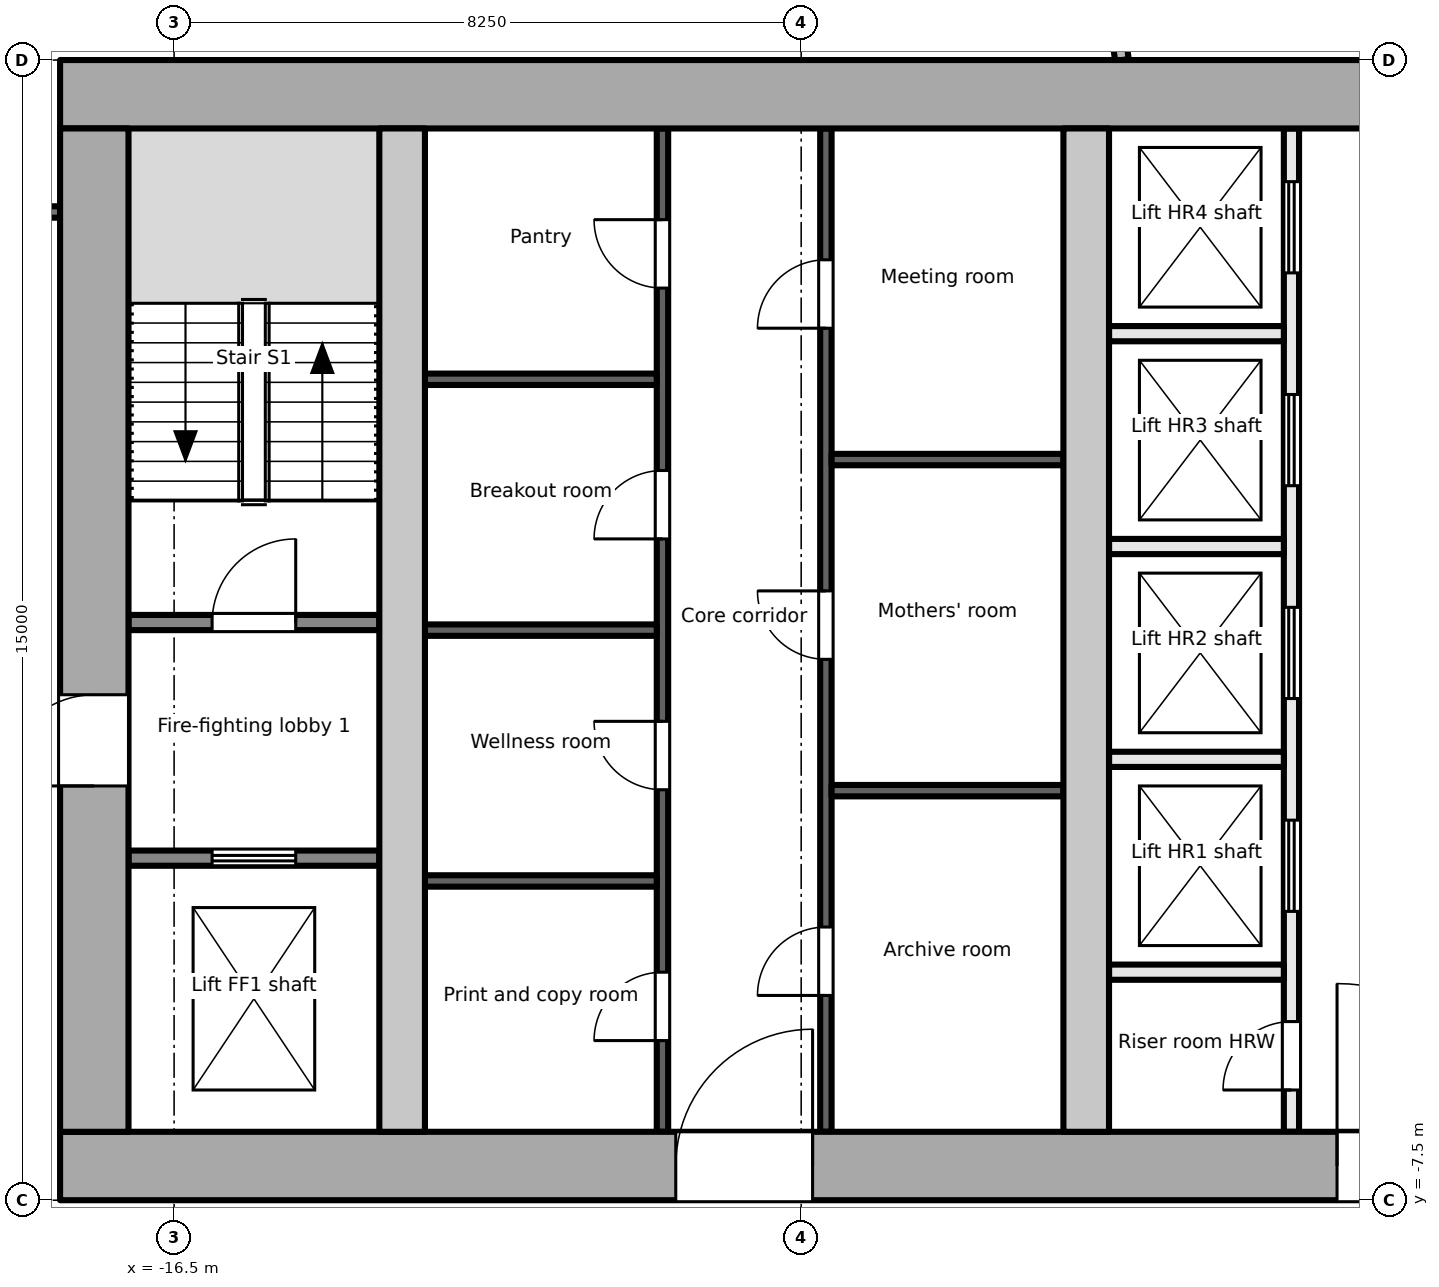
"""IFC4 building model, lengths in metres.
Left out: names, types, materials, properties, quantities, classifications, styles, units other than length and angle.
Written with IfcOpenShell. Run it as: python <this file> out.ifc"""

import sys

from ifc_helpers import new_model, si_unit, direction, frame, frame_2d, origin, place, context, subcontext, project, spatial, rectangle, extrude, element, fill, save


model = new_model("IFC4")
c1 = context("Model", 3, precision=1e-05, world=origin(), true_north=direction((0.0, 1.0)))
c2 = subcontext(c1, "Body", "Model", "MODEL_VIEW")
j1 = project(units=[si_unit("LENGTHUNIT", "METRE"), si_unit("PLANEANGLEUNIT", "RADIAN")], contexts=[c1])
p1 = place(None, origin())
s1 = spatial("IfcSite", under=j1, at=p1, CompositionType="ELEMENT")
p2 = place(p1, origin())
s2 = spatial("IfcBuilding", under=s1, at=p2, CompositionType="ELEMENT")
p3 = place(p2, frame((0.0, 0.0, 168.5)))
s3 = spatial("IfcBuildingStorey", under=s2, at=p3, CompositionType="ELEMENT", Elevation=168.5)
p4 = place(p3, frame((-18.0, -7.05, -0.2), z_axis=(0.0, 0.0, 1.0), x_axis=(1.0, 0.0, 0.0)))
e1 = element("IfcWall", 1, at=p4, inside=s3, PredefinedType="SHEAR", context=c2, shape_type="SweptSolid", body=[
    extrude(rectangle(XDim=36.0, YDim=0.9, at=frame_2d((18.0, 0.0))), origin(), (0.0, 0.0, 1.0), 3.9),
])
p5 = place(p4, frame((8.1, 0.0, 0.2)))
e2 = element("IfcOpeningElement", 2, at=p5, cuts=e1, PredefinedType="OPENING", context=c2, shape_type="SweptSolid", body=[
    extrude(rectangle(XDim=1.8, YDim=2.1, at=frame_2d((0.9, 1.05))), frame((0.0, 0.46, 0.0), z_axis=(0.0, -1.0, 0.0), x_axis=(1.0, 0.0, 0.0)), (0.0, 0.0, 1.0), 0.921),
])
p6 = place(p4, frame((16.8, 0.0, 0.2)))
e3 = element("IfcOpeningElement", 3, at=p6, cuts=e1, PredefinedType="OPENING", context=c2, shape_type="SweptSolid", body=[
    extrude(rectangle(XDim=2.4, YDim=2.1, at=frame_2d((1.2, 1.05))), frame((0.0, 0.46, 0.0), z_axis=(0.0, -1.0, 0.0), x_axis=(1.0, 0.0, 0.0)), (0.0, 0.0, 1.0), 0.921),
])
p7 = place(p4, frame((26.1, 0.0, 0.2)))
e4 = element("IfcOpeningElement", 4, at=p7, cuts=e1, PredefinedType="OPENING", context=c2, shape_type="SweptSolid", body=[
    extrude(rectangle(XDim=2.4, YDim=2.1, at=frame_2d((1.2, 1.05))), frame((0.0, 0.46, 0.0), z_axis=(0.0, -1.0, 0.0), x_axis=(1.0, 0.0, 0.0)), (0.0, 0.0, 1.0), 0.921),
])
p8 = place(p3, frame((-18.0, 7.05, -0.2), z_axis=(0.0, 0.0, 1.0), x_axis=(1.0, 0.0, 0.0)))
e5 = element("IfcWall", 5, at=p8, inside=s3, PredefinedType="SHEAR", context=c2, shape_type="SweptSolid", body=[
    extrude(rectangle(XDim=36.0, YDim=0.9, at=frame_2d((18.0, 0.0))), origin(), (0.0, 0.0, 1.0), 3.9),
])
p9 = place(p3, frame((-17.55, -6.6, -0.2), z_axis=(0.0, 0.0, 1.0), x_axis=(0.0, 1.0, 0.0)))
e6 = element("IfcWall", 6, at=p9, inside=s3, PredefinedType="SHEAR", context=c2, shape_type="SweptSolid", body=[
    extrude(rectangle(XDim=13.2, YDim=0.9, at=frame_2d((6.6, 0.0))), origin(), (0.0, 0.0, 1.0), 3.9),
])
p10 = place(p9, frame((4.55, 0.0, 0.2)))
e7 = element("IfcOpeningElement", 7, at=p10, cuts=e6, PredefinedType="OPENING", context=c2, shape_type="SweptSolid", body=[
    extrude(rectangle(XDim=1.2, YDim=2.1, at=frame_2d((0.6, 1.05))), frame((0.0, 0.46, 0.0), z_axis=(0.0, -1.0, 0.0), x_axis=(1.0, 0.0, 0.0)), (0.0, 0.0, 1.0), 0.921),
])
for number, where, z_axis, x_axis in (
    (8, (-13.5, -6.6, -0.2), (0.0, 0.0, 1.0), (0.0, 1.0, 0.0)),
    (9, (-4.5, -6.6, -0.2), (0.0, 0.0, 1.0), (0.0, 1.0, 0.0)),
):
    element("IfcWall", number, at=place(p3, frame(where, z_axis=z_axis, x_axis=x_axis)), inside=s3, PredefinedType="SHEAR", context=c2, shape_type="SweptSolid", body=[
        extrude(rectangle(XDim=13.2, YDim=0.6, at=frame_2d((6.6, 0.0))), origin(), (0.0, 0.0, 1.0), 3.9),
    ])
p11 = place(p3, frame((-17.1, -3.0, 0.0), z_axis=(0.0, 0.0, 1.0), x_axis=(1.0, 0.0, 0.0)))
e10 = element("IfcWall", 10, at=p11, inside=s3, PredefinedType="PARTITIONING", context=c2, shape_type="SweptSolid", body=[
    extrude(rectangle(XDim=3.3, YDim=0.2, at=frame_2d((1.65, 0.0))), origin(), (0.0, 0.0, 1.0), 3.7),
])
p12 = place(p11, frame((1.1, 0.0, 0.0)))
e11 = element("IfcOpeningElement", 11, at=p12, cuts=e10, PredefinedType="OPENING", context=c2, shape_type="SweptSolid", body=[
    extrude(rectangle(XDim=1.1, YDim=2.1, at=frame_2d((0.55, 1.05))), frame((0.0, 0.111, 0.0), z_axis=(0.0, -1.0, 0.0), x_axis=(1.0, 0.0, 0.0)), (0.0, 0.0, 1.0), 0.221),
])
p13 = place(p3, frame((-17.1, 0.1, 0.0), z_axis=(0.0, 0.0, 1.0), x_axis=(1.0, 0.0, 0.0)))
e12 = element("IfcWall", 12, at=p13, inside=s3, PredefinedType="PARTITIONING", context=c2, shape_type="SweptSolid", body=[
    extrude(rectangle(XDim=3.3, YDim=0.2, at=frame_2d((1.65, 0.0))), origin(), (0.0, 0.0, 1.0), 3.7),
])
p14 = place(p13, frame((1.1, 0.0, 0.0)))
e13 = element("IfcOpeningElement", 13, at=p14, cuts=e12, PredefinedType="OPENING", context=c2, shape_type="SweptSolid", body=[
    extrude(rectangle(XDim=1.1, YDim=2.1, at=frame_2d((0.55, 1.05))), frame((0.0, 0.111, 0.0), z_axis=(0.0, -1.0, 0.0), x_axis=(1.0, 0.0, 0.0)), (0.0, 0.0, 1.0), 0.221),
])
p15 = place(p3, frame((-10.075, -6.6, 0.0), z_axis=(0.0, 0.0, 1.0), x_axis=(0.0, 1.0, 0.0)))
e14 = element("IfcWall", 14, at=p15, inside=s3, PredefinedType="PARTITIONING", context=c2, shape_type="SweptSolid", body=[
    extrude(rectangle(XDim=13.2, YDim=0.15, at=frame_2d((6.6, 0.0))), origin(), (0.0, 0.0, 1.0), 3.7),
])
p16 = place(p15, frame((1.2, 0.0, 0.0)))
e15 = element("IfcOpeningElement", 15, at=p16, cuts=e14, PredefinedType="OPENING", context=c2, shape_type="SweptSolid", body=[
    extrude(rectangle(XDim=0.9, YDim=2.1, at=frame_2d((0.45, 1.05))), frame((0.0, 0.085, 0.0), z_axis=(0.0, -1.0, 0.0), x_axis=(1.0, 0.0, 0.0)), (0.0, 0.0, 1.0), 0.171),
])
p17 = place(p15, frame((4.5, 0.0, 0.0)))
e16 = element("IfcOpeningElement", 16, at=p17, cuts=e14, PredefinedType="OPENING", context=c2, shape_type="SweptSolid", body=[
    extrude(rectangle(XDim=0.9, YDim=2.1, at=frame_2d((0.45, 1.05))), frame((0.0, 0.085, 0.0), z_axis=(0.0, -1.0, 0.0), x_axis=(1.0, 0.0, 0.0)), (0.0, 0.0, 1.0), 0.171),
])
p18 = place(p15, frame((7.8, 0.0, 0.0)))
e17 = element("IfcOpeningElement", 17, at=p18, cuts=e14, PredefinedType="OPENING", context=c2, shape_type="SweptSolid", body=[
    extrude(rectangle(XDim=0.9, YDim=2.1, at=frame_2d((0.45, 1.05))), frame((0.0, 0.085, 0.0), z_axis=(0.0, -1.0, 0.0), x_axis=(1.0, 0.0, 0.0)), (0.0, 0.0, 1.0), 0.171),
])
p19 = place(p15, frame((11.1, 0.0, 0.0)))
e18 = element("IfcOpeningElement", 18, at=p19, cuts=e14, PredefinedType="OPENING", context=c2, shape_type="SweptSolid", body=[
    extrude(rectangle(XDim=0.9, YDim=2.1, at=frame_2d((0.45, 1.05))), frame((0.0, 0.085, 0.0), z_axis=(0.0, -1.0, 0.0), x_axis=(1.0, 0.0, 0.0)), (0.0, 0.0, 1.0), 0.171),
])
for number, where, z_axis, x_axis in (
    (19, (-13.2, -3.3, 0.0), (0.0, 0.0, 1.0), (1.0, 0.0, 0.0)),
    (20, (-13.2, 0.0, 0.0), (0.0, 0.0, 1.0), (1.0, 0.0, 0.0)),
    (21, (-13.2, 3.3, 0.0), (0.0, 0.0, 1.0), (1.0, 0.0, 0.0)),
):
    element("IfcWall", number, at=place(p3, frame(where, z_axis=z_axis, x_axis=x_axis)), inside=s3, PredefinedType="PARTITIONING", context=c2, shape_type="SweptSolid", body=[
        extrude(rectangle(XDim=3.05, YDim=0.15, at=frame_2d((1.525, 0.0))), origin(), (0.0, 0.0, 1.0), 3.7),
    ])
p20 = place(p3, frame((-7.925, -6.6, 0.0), z_axis=(0.0, 0.0, 1.0), x_axis=(0.0, 1.0, 0.0)))
e22 = element("IfcWall", 22, at=p20, inside=s3, PredefinedType="PARTITIONING", context=c2, shape_type="SweptSolid", body=[
    extrude(rectangle(XDim=13.2, YDim=0.15, at=frame_2d((6.6, 0.0))), origin(), (0.0, 0.0, 1.0), 3.7),
])
p21 = place(p20, frame((1.794, 0.0, 0.0)))
e23 = element("IfcOpeningElement", 23, at=p21, cuts=e22, PredefinedType="OPENING", context=c2, shape_type="SweptSolid", body=[
    extrude(rectangle(XDim=0.9, YDim=2.1, at=frame_2d((0.45, 1.05))), frame((0.0, 0.085, 0.0), z_axis=(0.0, -1.0, 0.0), x_axis=(1.0, 0.0, 0.0)), (0.0, 0.0, 1.0), 0.171),
])
p22 = place(p20, frame((6.216, 0.0, 0.0)))
e24 = element("IfcOpeningElement", 24, at=p22, cuts=e22, PredefinedType="OPENING", context=c2, shape_type="SweptSolid", body=[
    extrude(rectangle(XDim=0.9, YDim=2.1, at=frame_2d((0.45, 1.05))), frame((0.0, 0.085, 0.0), z_axis=(0.0, -1.0, 0.0), x_axis=(1.0, 0.0, 0.0)), (0.0, 0.0, 1.0), 0.171),
])
p23 = place(p20, frame((10.572, 0.0, 0.0)))
e25 = element("IfcOpeningElement", 25, at=p23, cuts=e22, PredefinedType="OPENING", context=c2, shape_type="SweptSolid", body=[
    extrude(rectangle(XDim=0.9, YDim=2.1, at=frame_2d((0.45, 1.05))), frame((0.0, 0.085, 0.0), z_axis=(0.0, -1.0, 0.0), x_axis=(1.0, 0.0, 0.0)), (0.0, 0.0, 1.0), 0.171),
])
for number, where, z_axis, x_axis in (
    (26, (-7.85, -2.112, 0.0), (0.0, 0.0, 1.0), (1.0, 0.0, 0.0)),
    (27, (-7.85, 2.244, 0.0), (0.0, 0.0, 1.0), (1.0, 0.0, 0.0)),
):
    element("IfcWall", number, at=place(p3, frame(where, z_axis=z_axis, x_axis=x_axis)), inside=s3, PredefinedType="PARTITIONING", context=c2, shape_type="SweptSolid", body=[
        extrude(rectangle(XDim=3.05, YDim=0.15, at=frame_2d((1.525, 0.0))), origin(), (0.0, 0.0, 1.0), 3.7),
    ])
p24 = place(p3, frame((-1.8, -6.6, 0.0), z_axis=(0.0, 0.0, 1.0), x_axis=(0.0, 1.0, 0.0)))
e28 = element("IfcWall", 28, at=p24, inside=s3, PredefinedType="PARTITIONING", context=c2, shape_type="SweptSolid", body=[
    extrude(rectangle(XDim=13.2, YDim=0.2, at=frame_2d((6.6, 0.0))), origin(), (0.0, 0.0, 1.0), 3.7),
])
p25 = place(p24, frame((0.55, 0.0, 0.0)))
e29 = element("IfcOpeningElement", 29, at=p25, cuts=e28, PredefinedType="OPENING", context=c2, shape_type="SweptSolid", body=[
    extrude(rectangle(XDim=0.9, YDim=2.1, at=frame_2d((0.45, 1.05))), frame((0.0, 0.111, 0.0), z_axis=(0.0, -1.0, 0.0), x_axis=(1.0, 0.0, 0.0)), (0.0, 0.0, 1.0), 0.221),
])
p26 = place(p24, frame((2.9, 0.0, 0.0)))
e30 = element("IfcOpeningElement", 30, at=p26, cuts=e28, PredefinedType="OPENING", context=c2, shape_type="SweptSolid", body=[
    extrude(rectangle(XDim=1.2, YDim=2.1, at=frame_2d((0.6, 1.05))), frame((0.0, 0.111, 0.0), z_axis=(0.0, -1.0, 0.0), x_axis=(1.0, 0.0, 0.0)), (0.0, 0.0, 1.0), 0.221),
])
p27 = place(p24, frame((5.7, 0.0, 0.0)))
e31 = element("IfcOpeningElement", 31, at=p27, cuts=e28, PredefinedType="OPENING", context=c2, shape_type="SweptSolid", body=[
    extrude(rectangle(XDim=1.2, YDim=2.1, at=frame_2d((0.6, 1.05))), frame((0.0, 0.111, 0.0), z_axis=(0.0, -1.0, 0.0), x_axis=(1.0, 0.0, 0.0)), (0.0, 0.0, 1.0), 0.221),
])
p28 = place(p24, frame((8.5, 0.0, 0.0)))
e32 = element("IfcOpeningElement", 32, at=p28, cuts=e28, PredefinedType="OPENING", context=c2, shape_type="SweptSolid", body=[
    extrude(rectangle(XDim=1.2, YDim=2.1, at=frame_2d((0.6, 1.05))), frame((0.0, 0.111, 0.0), z_axis=(0.0, -1.0, 0.0), x_axis=(1.0, 0.0, 0.0)), (0.0, 0.0, 1.0), 0.221),
])
p29 = place(p24, frame((11.3, 0.0, 0.0)))
e33 = element("IfcOpeningElement", 33, at=p29, cuts=e28, PredefinedType="OPENING", context=c2, shape_type="SweptSolid", body=[
    extrude(rectangle(XDim=1.2, YDim=2.1, at=frame_2d((0.6, 1.05))), frame((0.0, 0.111, 0.0), z_axis=(0.0, -1.0, 0.0), x_axis=(1.0, 0.0, 0.0)), (0.0, 0.0, 1.0), 0.221),
])
for number, where, z_axis, x_axis in (
    (34, (-4.2, -1.7, 0.0), (0.0, 0.0, 1.0), (1.0, 0.0, 0.0)),
    (35, (-4.2, 1.1, 0.0), (0.0, 0.0, 1.0), (1.0, 0.0, 0.0)),
    (36, (-4.2, 3.9, 0.0), (0.0, 0.0, 1.0), (1.0, 0.0, 0.0)),
    (37, (-4.2, -4.5, 0.0), (0.0, 0.0, 1.0), (1.0, 0.0, 0.0)),
):
    element("IfcWall", number, at=place(p3, frame(where, z_axis=z_axis, x_axis=x_axis)), inside=s3, PredefinedType="PARTITIONING", context=c2, shape_type="SweptSolid", body=[
        extrude(rectangle(XDim=2.3, YDim=0.2, at=frame_2d((1.15, 0.0))), origin(), (0.0, 0.0, 1.0), 3.7),
    ])
p30 = place(p3, frame((-20.325, 5.501, 0.0), z_axis=(0.0, 0.0, 1.0), x_axis=(1.0, 0.0, 0.0)))
e38 = element("IfcWall", 38, at=p30, inside=s3, PredefinedType="PARTITIONING", context=c2, shape_type="SweptSolid", body=[
    extrude(rectangle(XDim=2.325, YDim=0.15, at=frame_2d((1.163, 0.0))), origin(), (0.0, 0.0, 1.0), 3.7),
])
p31 = place(p3, frame((-4.437, 10.393, 0.0), z_axis=(0.0, 0.0, 1.0), x_axis=(0.139303486007, -0.990249735565, 0.0)))
e39 = element("IfcWall", 39, at=p31, inside=s3, PredefinedType="PARTITIONING", context=c2, shape_type="SweptSolid", body=[
    extrude(rectangle(XDim=2.922, YDim=0.18, at=frame_2d((1.461, 0.0))), origin(), (0.0, 0.0, 1.0), 3.25),
])
p32 = place(p12, origin())
e40 = element("IfcDoor", 40, at=p32, inside=s3, OperationType="DOUBLE_DOOR_SLIDING", PredefinedType="DOOR", context=c2, shape_type="SweptSolid", body=[
    extrude(rectangle(XDim=1.1, YDim=2.1, at=frame_2d((0.55, 1.05))), frame((0.0, 0.025, 0.0), z_axis=(0.0, -1.0, 0.0), x_axis=(1.0, 0.0, 0.0)), (0.0, 0.0, 1.0), 0.05),
])
fill(e11, e40)
p33 = place(p10, origin())
e41 = element("IfcDoor", 41, at=p33, inside=s3, OperationType="SINGLE_SWING_LEFT", PredefinedType="DOOR", context=c2, shape_type="SweptSolid", body=[
    extrude(rectangle(XDim=1.2, YDim=2.1, at=frame_2d((0.6, 1.05))), frame((0.0, 0.025, 0.0), z_axis=(0.0, -1.0, 0.0), x_axis=(1.0, 0.0, 0.0)), (0.0, 0.0, 1.0), 0.05),
])
fill(e7, e41)
p34 = place(p14, origin())
e42 = element("IfcDoor", 42, at=p34, inside=s3, OperationType="SINGLE_SWING_RIGHT", PredefinedType="DOOR", context=c2, shape_type="SweptSolid", body=[
    extrude(rectangle(XDim=1.1, YDim=2.1, at=frame_2d((0.55, 1.05))), frame((0.0, 0.025, 0.0), z_axis=(0.0, -1.0, 0.0), x_axis=(1.0, 0.0, 0.0)), (0.0, 0.0, 1.0), 0.05),
])
fill(e13, e42)
p35 = place(p16, origin())
e43 = element("IfcDoor", 43, at=p35, inside=s3, OperationType="SINGLE_SWING_LEFT", PredefinedType="DOOR", context=c2, shape_type="SweptSolid", body=[
    extrude(rectangle(XDim=0.9, YDim=2.1, at=frame_2d((0.45, 1.05))), frame((0.0, 0.025, 0.0), z_axis=(0.0, -1.0, 0.0), x_axis=(1.0, 0.0, 0.0)), (0.0, 0.0, 1.0), 0.05),
])
fill(e15, e43)
p36 = place(p17, origin())
e44 = element("IfcDoor", 44, at=p36, inside=s3, OperationType="SINGLE_SWING_RIGHT", PredefinedType="DOOR", context=c2, shape_type="SweptSolid", body=[
    extrude(rectangle(XDim=0.9, YDim=2.1, at=frame_2d((0.45, 1.05))), frame((0.0, 0.025, 0.0), z_axis=(0.0, -1.0, 0.0), x_axis=(1.0, 0.0, 0.0)), (0.0, 0.0, 1.0), 0.05),
])
fill(e16, e44)
p37 = place(p18, origin())
e45 = element("IfcDoor", 45, at=p37, inside=s3, OperationType="SINGLE_SWING_LEFT", PredefinedType="DOOR", context=c2, shape_type="SweptSolid", body=[
    extrude(rectangle(XDim=0.9, YDim=2.1, at=frame_2d((0.45, 1.05))), frame((0.0, 0.025, 0.0), z_axis=(0.0, -1.0, 0.0), x_axis=(1.0, 0.0, 0.0)), (0.0, 0.0, 1.0), 0.05),
])
fill(e17, e45)
p38 = place(p19, origin())
e46 = element("IfcDoor", 46, at=p38, inside=s3, OperationType="SINGLE_SWING_RIGHT", PredefinedType="DOOR", context=c2, shape_type="SweptSolid", body=[
    extrude(rectangle(XDim=0.9, YDim=2.1, at=frame_2d((0.45, 1.05))), frame((0.0, 0.025, 0.0), z_axis=(0.0, -1.0, 0.0), x_axis=(1.0, 0.0, 0.0)), (0.0, 0.0, 1.0), 0.05),
])
fill(e18, e46)
p39 = place(p21, origin())
e47 = element("IfcDoor", 47, at=p39, inside=s3, OperationType="SINGLE_SWING_LEFT", PredefinedType="DOOR", context=c2, shape_type="SweptSolid", body=[
    extrude(rectangle(XDim=0.9, YDim=2.1, at=frame_2d((0.45, 1.05))), frame((0.0, 0.025, 0.0), z_axis=(0.0, -1.0, 0.0), x_axis=(1.0, 0.0, 0.0)), (0.0, 0.0, 1.0), 0.05),
])
fill(e23, e47)
p40 = place(p22, origin())
e48 = element("IfcDoor", 48, at=p40, inside=s3, OperationType="SINGLE_SWING_RIGHT", PredefinedType="DOOR", context=c2, shape_type="SweptSolid", body=[
    extrude(rectangle(XDim=0.9, YDim=2.1, at=frame_2d((0.45, 1.05))), frame((0.0, 0.025, 0.0), z_axis=(0.0, -1.0, 0.0), x_axis=(1.0, 0.0, 0.0)), (0.0, 0.0, 1.0), 0.05),
])
fill(e24, e48)
p41 = place(p23, origin())
e49 = element("IfcDoor", 49, at=p41, inside=s3, OperationType="SINGLE_SWING_LEFT", PredefinedType="DOOR", context=c2, shape_type="SweptSolid", body=[
    extrude(rectangle(XDim=0.9, YDim=2.1, at=frame_2d((0.45, 1.05))), frame((0.0, 0.025, 0.0), z_axis=(0.0, -1.0, 0.0), x_axis=(1.0, 0.0, 0.0)), (0.0, 0.0, 1.0), 0.05),
])
fill(e25, e49)
p42 = place(p5, origin())
e50 = element("IfcDoor", 50, at=p42, inside=s3, OperationType="SINGLE_SWING_RIGHT", PredefinedType="DOOR", context=c2, shape_type="SweptSolid", body=[
    extrude(rectangle(XDim=1.8, YDim=2.1, at=frame_2d((0.9, 1.05))), frame((0.0, 0.025, 0.0), z_axis=(0.0, -1.0, 0.0), x_axis=(1.0, 0.0, 0.0)), (0.0, 0.0, 1.0), 0.05),
])
fill(e2, e50)
p43 = place(p25, origin())
e51 = element("IfcDoor", 51, at=p43, inside=s3, OperationType="SINGLE_SWING_LEFT", PredefinedType="DOOR", context=c2, shape_type="SweptSolid", body=[
    extrude(rectangle(XDim=0.9, YDim=2.1, at=frame_2d((0.45, 1.05))), frame((0.0, 0.025, 0.0), z_axis=(0.0, -1.0, 0.0), x_axis=(1.0, 0.0, 0.0)), (0.0, 0.0, 1.0), 0.05),
])
fill(e29, e51)
p44 = place(p26, origin())
e52 = element("IfcDoor", 52, at=p44, inside=s3, OperationType="DOUBLE_DOOR_SLIDING", PredefinedType="DOOR", context=c2, shape_type="SweptSolid", body=[
    extrude(rectangle(XDim=1.2, YDim=2.1, at=frame_2d((0.6, 1.05))), frame((0.0, 0.025, 0.0), z_axis=(0.0, -1.0, 0.0), x_axis=(1.0, 0.0, 0.0)), (0.0, 0.0, 1.0), 0.05),
])
fill(e30, e52)
p45 = place(p27, origin())
e53 = element("IfcDoor", 53, at=p45, inside=s3, OperationType="DOUBLE_DOOR_SLIDING", PredefinedType="DOOR", context=c2, shape_type="SweptSolid", body=[
    extrude(rectangle(XDim=1.2, YDim=2.1, at=frame_2d((0.6, 1.05))), frame((0.0, 0.025, 0.0), z_axis=(0.0, -1.0, 0.0), x_axis=(1.0, 0.0, 0.0)), (0.0, 0.0, 1.0), 0.05),
])
fill(e31, e53)
p46 = place(p28, origin())
e54 = element("IfcDoor", 54, at=p46, inside=s3, OperationType="DOUBLE_DOOR_SLIDING", PredefinedType="DOOR", context=c2, shape_type="SweptSolid", body=[
    extrude(rectangle(XDim=1.2, YDim=2.1, at=frame_2d((0.6, 1.05))), frame((0.0, 0.025, 0.0), z_axis=(0.0, -1.0, 0.0), x_axis=(1.0, 0.0, 0.0)), (0.0, 0.0, 1.0), 0.05),
])
fill(e32, e54)
p47 = place(p29, origin())
e55 = element("IfcDoor", 55, at=p47, inside=s3, OperationType="DOUBLE_DOOR_SLIDING", PredefinedType="DOOR", context=c2, shape_type="SweptSolid", body=[
    extrude(rectangle(XDim=1.2, YDim=2.1, at=frame_2d((0.6, 1.05))), frame((0.0, 0.025, 0.0), z_axis=(0.0, -1.0, 0.0), x_axis=(1.0, 0.0, 0.0)), (0.0, 0.0, 1.0), 0.05),
])
fill(e33, e55)
p48 = place(p6, origin())
e56 = element("IfcDoor", 56, at=p48, inside=s3, OperationType="DOUBLE_DOOR_DOUBLE_SWING", PredefinedType="DOOR", context=c2, shape_type="SweptSolid", body=[
    extrude(rectangle(XDim=2.4, YDim=2.1, at=frame_2d((1.2, 1.05))), frame((0.0, 0.025, 0.0), z_axis=(0.0, -1.0, 0.0), x_axis=(1.0, 0.0, 0.0)), (0.0, 0.0, 1.0), 0.05),
])
fill(e3, e56)
save(model, sys.argv[1])
